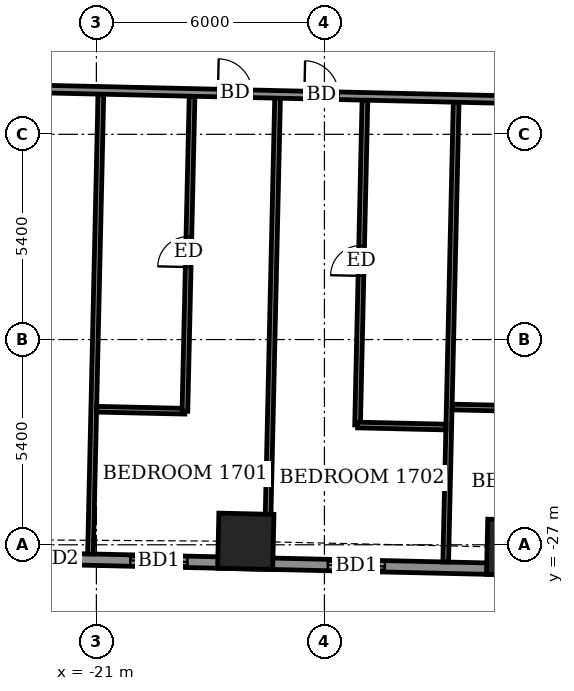
"""IFC4 building model, lengths in metres.
Left out: names, types, materials, properties, quantities, classifications, styles, units other than length and angle.
Written with IfcOpenShell. Run it as: python <this file> out.ifc"""

import sys

from ifc_helpers import new_model, si_unit, direction, frame, frame_2d, origin, origin_2d, place, context, subcontext, project, spatial, rectangle, extrude, element, fill, save


model = new_model("IFC4")
c1 = context("Model", 3, precision=1e-05, world=origin(), true_north=direction((0.0, 1.0)))
c2 = subcontext(c1, "Body", "Model", "MODEL_VIEW")
j1 = project(units=[si_unit("LENGTHUNIT", "METRE"), si_unit("PLANEANGLEUNIT", "RADIAN")], contexts=[c1])
p1 = place(None, origin())
s1 = spatial("IfcSite", under=j1, at=p1, CompositionType="ELEMENT")
p2 = place(p1, origin())
s2 = spatial("IfcBuilding", under=s1, at=p2, CompositionType="ELEMENT")
p3 = place(p2, frame((0.0, 0.0, 71.1)))
s3 = spatial("IfcBuildingStorey", under=s2, at=p3, CompositionType="ELEMENT", Elevation=71.1)
for number, where, z_axis, x_axis in (
    (1, (-17.07, -26.908, -0.55), (0.0, 0.0, 1.0), (1.0, -0.023, 0.0)),
    (2, (-9.995, -27.068, -0.55), (0.0, 0.0, 1.0), (1.0, -0.023, 0.0)),
):
    element("IfcColumn", number, at=place(p3, frame(where, z_axis=z_axis, x_axis=x_axis)), inside=s3, PredefinedType="COLUMN", context=c2, shape_type="SweptSolid", body=[
        extrude(rectangle(XDim=1.45, YDim=1.45, at=origin_2d()), origin(), (0.0, 0.0, 1.0), 3.6),
    ])
p4 = place(p3, frame((-24.007, -27.326, 0.0), z_axis=(0.0, 0.0, 1.0), x_axis=(0.999742536491, -0.022690542744, 0.0)))
e3 = element("IfcWall", 3, at=p4, inside=s3, PredefinedType="SOLIDWALL", context=c2, shape_type="SweptSolid", body=[
    extrude(rectangle(XDim=49.236, YDim=0.3, at=frame_2d((24.618, 0.0))), origin(), (0.0, 0.0, 1.0), 3.05),
])
p5 = place(p4, frame((1.391, 0.0, 0.0)))
e4 = element("IfcOpeningElement", 4, at=p5, cuts=e3, PredefinedType="OPENING", context=c2, shape_type="SweptSolid", body=[
    extrude(rectangle(XDim=1.2, YDim=2.4, at=frame_2d((0.6, 1.2))), frame((0.0, 0.16, 0.0), z_axis=(0.0, -1.0, 0.0), x_axis=(1.0, 0.0, 0.0)), (0.0, 0.0, 1.0), 0.32),
])
p6 = place(p4, frame((3.901, 0.0, 0.0)))
e5 = element("IfcOpeningElement", 5, at=p6, cuts=e3, PredefinedType="OPENING", context=c2, shape_type="SweptSolid", body=[
    extrude(rectangle(XDim=1.5, YDim=2.4, at=frame_2d((0.75, 1.2))), frame((0.0, 0.16, 0.0), z_axis=(0.0, -1.0, 0.0), x_axis=(1.0, 0.0, 0.0)), (0.0, 0.0, 1.0), 0.32),
])
p7 = place(p4, frame((9.1, 0.0, 0.0)))
e6 = element("IfcOpeningElement", 6, at=p7, cuts=e3, PredefinedType="OPENING", context=c2, shape_type="SweptSolid", body=[
    extrude(rectangle(XDim=1.5, YDim=2.4, at=frame_2d((0.75, 1.2))), frame((0.0, 0.16, 0.0), z_axis=(0.0, -1.0, 0.0), x_axis=(1.0, 0.0, 0.0)), (0.0, 0.0, 1.0), 0.32),
])
p8 = place(p4, frame((14.889, 0.0, 0.0)))
e7 = element("IfcOpeningElement", 7, at=p8, cuts=e3, PredefinedType="OPENING", context=c2, shape_type="SweptSolid", body=[
    extrude(rectangle(XDim=1.5, YDim=2.4, at=frame_2d((0.75, 1.2))), frame((0.0, 0.16, 0.0), z_axis=(0.0, -1.0, 0.0), x_axis=(1.0, 0.0, 0.0)), (0.0, 0.0, 1.0), 0.32),
])
p9 = place(p4, frame((17.952, 0.0, 0.0)))
e8 = element("IfcOpeningElement", 8, at=p9, cuts=e3, PredefinedType="OPENING", context=c2, shape_type="SweptSolid", body=[
    extrude(rectangle(XDim=1.5, YDim=2.4, at=frame_2d((0.75, 1.2))), frame((0.0, 0.16, 0.0), z_axis=(0.0, -1.0, 0.0), x_axis=(1.0, 0.0, 0.0)), (0.0, 0.0, 1.0), 0.32),
])
p10 = place(p4, frame((22.878, 0.0, 0.0)))
e9 = element("IfcOpeningElement", 9, at=p10, cuts=e3, PredefinedType="OPENING", context=c2, shape_type="SweptSolid", body=[
    extrude(rectangle(XDim=1.5, YDim=2.4, at=frame_2d((0.75, 1.2))), frame((0.0, 0.16, 0.0), z_axis=(0.0, -1.0, 0.0), x_axis=(1.0, 0.0, 0.0)), (0.0, 0.0, 1.0), 0.32),
])
p11 = place(p4, frame((26.091, 0.0, 0.0)))
e10 = element("IfcOpeningElement", 10, at=p11, cuts=e3, PredefinedType="OPENING", context=c2, shape_type="SweptSolid", body=[
    extrude(rectangle(XDim=1.2, YDim=2.4, at=frame_2d((0.6, 1.2))), frame((0.0, 0.16, 0.0), z_axis=(0.0, -1.0, 0.0), x_axis=(1.0, 0.0, 0.0)), (0.0, 0.0, 1.0), 0.32),
])
p12 = place(p4, frame((31.754, 0.0, 0.0)))
e11 = element("IfcOpeningElement", 11, at=p12, cuts=e3, PredefinedType="OPENING", context=c2, shape_type="SweptSolid", body=[
    extrude(rectangle(XDim=1.5, YDim=2.4, at=frame_2d((0.75, 1.2))), frame((0.0, 0.16, 0.0), z_axis=(0.0, -1.0, 0.0), x_axis=(1.0, 0.0, 0.0)), (0.0, 0.0, 1.0), 0.32),
])
p13 = place(p4, frame((36.854, 0.0, 0.0)))
e12 = element("IfcOpeningElement", 12, at=p13, cuts=e3, PredefinedType="OPENING", context=c2, shape_type="SweptSolid", body=[
    extrude(rectangle(XDim=1.5, YDim=2.4, at=frame_2d((0.75, 1.2))), frame((0.0, 0.16, 0.0), z_axis=(0.0, -1.0, 0.0), x_axis=(1.0, 0.0, 0.0)), (0.0, 0.0, 1.0), 0.32),
])
p14 = place(p4, frame((39.917, 0.0, 0.0)))
e13 = element("IfcOpeningElement", 13, at=p14, cuts=e3, PredefinedType="OPENING", context=c2, shape_type="SweptSolid", body=[
    extrude(rectangle(XDim=1.5, YDim=2.4, at=frame_2d((0.75, 1.2))), frame((0.0, 0.16, 0.0), z_axis=(0.0, -1.0, 0.0), x_axis=(1.0, 0.0, 0.0)), (0.0, 0.0, 1.0), 0.32),
])
p15 = place(p4, frame((45.072, 0.0, 0.9)))
e14 = element("IfcOpeningElement", 14, at=p15, cuts=e3, PredefinedType="OPENING", context=c2, shape_type="SweptSolid", body=[
    extrude(rectangle(XDim=2.4, YDim=1.5, at=frame_2d((1.2, 0.75))), frame((0.0, 0.16, 0.0), z_axis=(0.0, -1.0, 0.0), x_axis=(1.0, 0.0, 0.0)), (0.0, 0.0, 1.0), 0.32),
])
p16 = place(p3, frame((-21.156, -27.241, 0.0), z_axis=(0.0, 0.0, 1.0), x_axis=(0.022636621344, 0.999743758857, 0.0)))
e15 = element("IfcWall", 15, at=p16, inside=s3, PredefinedType="PARTITIONING", context=c2, shape_type="SweptSolid", body=[
    extrude(rectangle(XDim=12.101, YDim=0.15, at=frame_2d((6.051, 0.0))), origin(), (0.0, 0.0, 1.0), 2.55),
])
p17 = place(p3, frame((-16.508, -27.346, 0.0), z_axis=(0.0, 0.0, 1.0), x_axis=(0.02273928012, 0.99974142914, 0.0)))
e16 = element("IfcWall", 16, at=p17, inside=s3, PredefinedType="PARTITIONING", context=c2, shape_type="SweptSolid", body=[
    extrude(rectangle(XDim=12.1, YDim=0.15, at=frame_2d((6.05, 0.0))), origin(), (0.0, 0.0, 1.0), 3.05),
])
p18 = place(p3, frame((-11.809, -27.453, 0.0), z_axis=(0.0, 0.0, 1.0), x_axis=(0.02273928012, 0.99974142914, 0.0)))
e17 = element("IfcWall", 17, at=p18, inside=s3, PredefinedType="PARTITIONING", context=c2, shape_type="SweptSolid", body=[
    extrude(rectangle(XDim=12.1, YDim=0.15, at=frame_2d((6.05, 0.0))), origin(), (0.0, 0.0, 1.0), 2.55),
])
p19 = place(p3, frame((-14.128, -23.849, 0.0), z_axis=(0.0, 0.0, 1.0), x_axis=(0.022671462533, 0.999742969361, 0.0)))
e18 = element("IfcWall", 18, at=p19, inside=s3, PredefinedType="PARTITIONING", context=c2, shape_type="SweptSolid", body=[
    extrude(rectangle(XDim=8.55, YDim=0.15, at=frame_2d((4.275, 0.0))), origin(), (0.0, 0.0, 1.0), 3.05),
])
p20 = place(p19, frame((3.925, 0.0, 0.0)))
e19 = element("IfcOpeningElement", 19, at=p20, cuts=e18, PredefinedType="OPENING", context=c2, shape_type="SweptSolid", body=[
    extrude(rectangle(XDim=0.8, YDim=2.1, at=frame_2d((0.4, 1.05))), frame((0.0, 0.085, 0.0), z_axis=(0.0, -1.0, 0.0), x_axis=(1.0, 0.0, 0.0)), (0.0, 0.0, 1.0), 0.17),
])
p21 = place(p3, frame((-14.126, -23.849, 0.0), z_axis=(0.0, 0.0, 1.0), x_axis=(0.999740478815, -0.022781023197, 0.0)))
e20 = element("IfcWall", 20, at=p21, inside=s3, PredefinedType="PARTITIONING", context=c2, shape_type="SweptSolid", body=[
    extrude(rectangle(XDim=2.325, YDim=0.15, at=frame_2d((1.163, 0.0))), origin(), (0.0, 0.0, 1.0), 3.05),
])
p22 = place(p3, frame((-20.993, -23.433, 0.0), z_axis=(0.0, 0.0, 1.0), x_axis=(0.999740260747, -0.02279059109, 0.0)))
e21 = element("IfcWall", 21, at=p22, inside=s3, PredefinedType="PARTITIONING", context=c2, shape_type="SweptSolid", body=[
    extrude(rectangle(XDim=2.324, YDim=0.15, at=frame_2d((1.162, 0.0))), origin(), (0.0, 0.0, 1.0), 3.05),
])
p23 = place(p3, frame((-18.671, -23.486, 0.0), z_axis=(0.0, 0.0, 1.0), x_axis=(0.022675916361, 0.99974286835, 0.0)))
e22 = element("IfcWall", 22, at=p23, inside=s3, PredefinedType="PARTITIONING", context=c2, shape_type="SweptSolid", body=[
    extrude(rectangle(XDim=8.29, YDim=0.15, at=frame_2d((4.145, 0.0))), origin(), (0.0, 0.0, 1.0), 3.05),
])
p24 = place(p23, frame((3.795, 0.0, 0.0)))
e23 = element("IfcOpeningElement", 23, at=p24, cuts=e22, PredefinedType="OPENING", context=c2, shape_type="SweptSolid", body=[
    extrude(rectangle(XDim=0.8, YDim=2.1, at=frame_2d((0.4, 1.05))), frame((0.0, 0.085, 0.0), z_axis=(0.0, -1.0, 0.0), x_axis=(1.0, 0.0, 0.0)), (0.0, 0.0, 1.0), 0.17),
])
p25 = place(p3, frame((-11.639, -23.375, 0.0), z_axis=(0.0, 0.0, 1.0), x_axis=(0.999740260747, -0.02279059109, 0.0)))
e24 = element("IfcWall", 24, at=p25, inside=s3, PredefinedType="PARTITIONING", context=c2, shape_type="SweptSolid", body=[
    extrude(rectangle(XDim=2.324, YDim=0.15, at=frame_2d((1.162, 0.0))), origin(), (0.0, 0.0, 1.0), 3.05),
])
p26 = place(p3, frame((-26.151, -14.924, 0.0), z_axis=(0.0, 0.0, 1.0), x_axis=(0.999742750999, -0.022681089575, 0.0)))
e25 = element("IfcWall", 25, at=p26, inside=s3, PredefinedType="PARTITIONING", context=c2, shape_type="SweptSolid", body=[
    extrude(rectangle(XDim=54.886, YDim=0.2, at=frame_2d((27.443, 0.0))), origin(), (0.0, 0.0, 1.0), 3.05),
])
p27 = place(p26, frame((1.345, 0.0, 0.0)))
e26 = element("IfcOpeningElement", 26, at=p27, cuts=e25, PredefinedType="OPENING", context=c2, shape_type="SweptSolid", body=[
    extrude(rectangle(XDim=1.0, YDim=2.1, at=frame_2d((0.5, 1.05))), frame((0.0, 0.11, 0.0), z_axis=(0.0, -1.0, 0.0), x_axis=(1.0, 0.0, 0.0)), (0.0, 0.0, 1.0), 0.22),
])
p28 = place(p26, frame((8.35, 0.0, 0.0)))
e27 = element("IfcOpeningElement", 27, at=p28, cuts=e25, PredefinedType="OPENING", context=c2, shape_type="SweptSolid", body=[
    extrude(rectangle(XDim=0.9, YDim=2.1, at=frame_2d((0.45, 1.05))), frame((0.0, 0.11, 0.0), z_axis=(0.0, -1.0, 0.0), x_axis=(1.0, 0.0, 0.0)), (0.0, 0.0, 1.0), 0.22),
])
p29 = place(p26, frame((10.625, 0.0, 0.0)))
e28 = element("IfcOpeningElement", 28, at=p29, cuts=e25, PredefinedType="OPENING", context=c2, shape_type="SweptSolid", body=[
    extrude(rectangle(XDim=0.9, YDim=2.1, at=frame_2d((0.45, 1.05))), frame((0.0, 0.11, 0.0), z_axis=(0.0, -1.0, 0.0), x_axis=(1.0, 0.0, 0.0)), (0.0, 0.0, 1.0), 0.22),
])
p30 = place(p26, frame((17.675, 0.0, 0.0)))
e29 = element("IfcOpeningElement", 29, at=p30, cuts=e25, PredefinedType="OPENING", context=c2, shape_type="SweptSolid", body=[
    extrude(rectangle(XDim=0.9, YDim=2.1, at=frame_2d((0.45, 1.05))), frame((0.0, 0.11, 0.0), z_axis=(0.0, -1.0, 0.0), x_axis=(1.0, 0.0, 0.0)), (0.0, 0.0, 1.0), 0.22),
])
p31 = place(p26, frame((19.725, 0.0, 0.0)))
e30 = element("IfcOpeningElement", 30, at=p31, cuts=e25, PredefinedType="OPENING", context=c2, shape_type="SweptSolid", body=[
    extrude(rectangle(XDim=0.9, YDim=2.1, at=frame_2d((0.45, 1.05))), frame((0.0, 0.11, 0.0), z_axis=(0.0, -1.0, 0.0), x_axis=(1.0, 0.0, 0.0)), (0.0, 0.0, 1.0), 0.22),
])
p32 = place(p26, frame((26.575, 0.0, 0.0)))
e31 = element("IfcOpeningElement", 31, at=p32, cuts=e25, PredefinedType="OPENING", context=c2, shape_type="SweptSolid", body=[
    extrude(rectangle(XDim=0.9, YDim=2.1, at=frame_2d((0.45, 1.05))), frame((0.0, 0.11, 0.0), z_axis=(0.0, -1.0, 0.0), x_axis=(1.0, 0.0, 0.0)), (0.0, 0.0, 1.0), 0.22),
])
p33 = place(p26, frame((28.75, 0.0, 0.0)))
e32 = element("IfcOpeningElement", 32, at=p33, cuts=e25, PredefinedType="OPENING", context=c2, shape_type="SweptSolid", body=[
    extrude(rectangle(XDim=0.9, YDim=2.1, at=frame_2d((0.45, 1.05))), frame((0.0, 0.11, 0.0), z_axis=(0.0, -1.0, 0.0), x_axis=(1.0, 0.0, 0.0)), (0.0, 0.0, 1.0), 0.22),
])
p34 = place(p26, frame((35.875, 0.0, 0.0)))
e33 = element("IfcOpeningElement", 33, at=p34, cuts=e25, PredefinedType="OPENING", context=c2, shape_type="SweptSolid", body=[
    extrude(rectangle(XDim=0.9, YDim=2.1, at=frame_2d((0.45, 1.05))), frame((0.0, 0.11, 0.0), z_axis=(0.0, -1.0, 0.0), x_axis=(1.0, 0.0, 0.0)), (0.0, 0.0, 1.0), 0.22),
])
p35 = place(p26, frame((38.1, 0.0, 0.0)))
e34 = element("IfcOpeningElement", 34, at=p35, cuts=e25, PredefinedType="OPENING", context=c2, shape_type="SweptSolid", body=[
    extrude(rectangle(XDim=0.9, YDim=2.1, at=frame_2d((0.45, 1.05))), frame((0.0, 0.11, 0.0), z_axis=(0.0, -1.0, 0.0), x_axis=(1.0, 0.0, 0.0)), (0.0, 0.0, 1.0), 0.22),
])
p36 = place(p26, frame((45.125, 0.0, 0.0)))
e35 = element("IfcOpeningElement", 35, at=p36, cuts=e25, PredefinedType="OPENING", context=c2, shape_type="SweptSolid", body=[
    extrude(rectangle(XDim=0.9, YDim=2.1, at=frame_2d((0.45, 1.05))), frame((0.0, 0.11, 0.0), z_axis=(0.0, -1.0, 0.0), x_axis=(1.0, 0.0, 0.0)), (0.0, 0.0, 1.0), 0.22),
])
p37 = place(p26, frame((52.618, 0.0, 0.0)))
e36 = element("IfcOpeningElement", 36, at=p37, cuts=e25, PredefinedType="OPENING", context=c2, shape_type="SweptSolid", body=[
    extrude(rectangle(XDim=1.0, YDim=2.1, at=frame_2d((0.5, 1.05))), frame((0.0, 0.11, 0.0), z_axis=(0.0, -1.0, 0.0), x_axis=(1.0, 0.0, 0.0)), (0.0, 0.0, 1.0), 0.22),
])
p38 = place(p26, frame((47.575, 0.0, 0.0)))
e37 = element("IfcOpeningElement", 37, at=p38, cuts=e25, PredefinedType="OPENING", context=c2, shape_type="SweptSolid", body=[
    extrude(rectangle(XDim=0.9, YDim=2.1, at=frame_2d((0.45, 1.05))), frame((0.0, 0.11, 0.0), z_axis=(0.0, -1.0, 0.0), x_axis=(1.0, 0.0, 0.0)), (0.0, 0.0, 1.0), 0.22),
])
p39 = place(p5, origin())
e38 = element("IfcDoor", 38, at=p39, inside=s3, OperationType="SLIDING_TO_LEFT", PredefinedType="DOOR", context=c2, shape_type="SweptSolid", body=[
    extrude(rectangle(XDim=1.2, YDim=2.4, at=frame_2d((0.6, 1.2))), frame((0.0, 0.025, 0.0), z_axis=(0.0, -1.0, 0.0), x_axis=(1.0, 0.0, 0.0)), (0.0, 0.0, 1.0), 0.05),
])
fill(e4, e38)
p40 = place(p6, origin())
e39 = element("IfcDoor", 39, at=p40, inside=s3, OperationType="SLIDING_TO_LEFT", PredefinedType="DOOR", context=c2, shape_type="SweptSolid", body=[
    extrude(rectangle(XDim=1.5, YDim=2.4, at=frame_2d((0.75, 1.2))), frame((0.0, 0.025, 0.0), z_axis=(0.0, -1.0, 0.0), x_axis=(1.0, 0.0, 0.0)), (0.0, 0.0, 1.0), 0.05),
])
fill(e5, e39)
p41 = place(p7, origin())
e40 = element("IfcDoor", 40, at=p41, inside=s3, OperationType="SLIDING_TO_LEFT", PredefinedType="DOOR", context=c2, shape_type="SweptSolid", body=[
    extrude(rectangle(XDim=1.5, YDim=2.4, at=frame_2d((0.75, 1.2))), frame((0.0, 0.025, 0.0), z_axis=(0.0, -1.0, 0.0), x_axis=(1.0, 0.0, 0.0)), (0.0, 0.0, 1.0), 0.05),
])
fill(e6, e40)
p42 = place(p28, origin())
e41 = element("IfcDoor", 41, at=p42, inside=s3, OperationType="SINGLE_SWING_LEFT", PredefinedType="DOOR", context=c2, shape_type="SweptSolid", body=[
    extrude(rectangle(XDim=0.9, YDim=2.1, at=frame_2d((0.45, 1.05))), frame((0.0, 0.025, 0.0), z_axis=(0.0, -1.0, 0.0), x_axis=(1.0, 0.0, 0.0)), (0.0, 0.0, 1.0), 0.05),
])
fill(e27, e41)
p43 = place(p24, origin())
e42 = element("IfcDoor", 42, at=p43, inside=s3, OperationType="SINGLE_SWING_LEFT", PredefinedType="DOOR", context=c2, shape_type="SweptSolid", body=[
    extrude(rectangle(XDim=0.8, YDim=2.1, at=frame_2d((0.4, 1.05))), frame((0.0, 0.025, 0.0), z_axis=(0.0, -1.0, 0.0), x_axis=(1.0, 0.0, 0.0)), (0.0, 0.0, 1.0), 0.05),
])
fill(e23, e42)
p44 = place(p29, origin())
e43 = element("IfcDoor", 43, at=p44, inside=s3, OperationType="SINGLE_SWING_RIGHT", PredefinedType="DOOR", context=c2, shape_type="SweptSolid", body=[
    extrude(rectangle(XDim=0.9, YDim=2.1, at=frame_2d((0.45, 1.05))), frame((0.0, 0.025, 0.0), z_axis=(0.0, -1.0, 0.0), x_axis=(1.0, 0.0, 0.0)), (0.0, 0.0, 1.0), 0.05),
])
fill(e28, e43)
p45 = place(p20, origin())
e44 = element("IfcDoor", 44, at=p45, inside=s3, OperationType="SINGLE_SWING_RIGHT", PredefinedType="DOOR", context=c2, shape_type="SweptSolid", body=[
    extrude(rectangle(XDim=0.8, YDim=2.1, at=frame_2d((0.4, 1.05))), frame((0.0, 0.025, 0.0), z_axis=(0.0, -1.0, 0.0), x_axis=(1.0, 0.0, 0.0)), (0.0, 0.0, 1.0), 0.05),
])
fill(e19, e44)
save(model, sys.argv[1])
